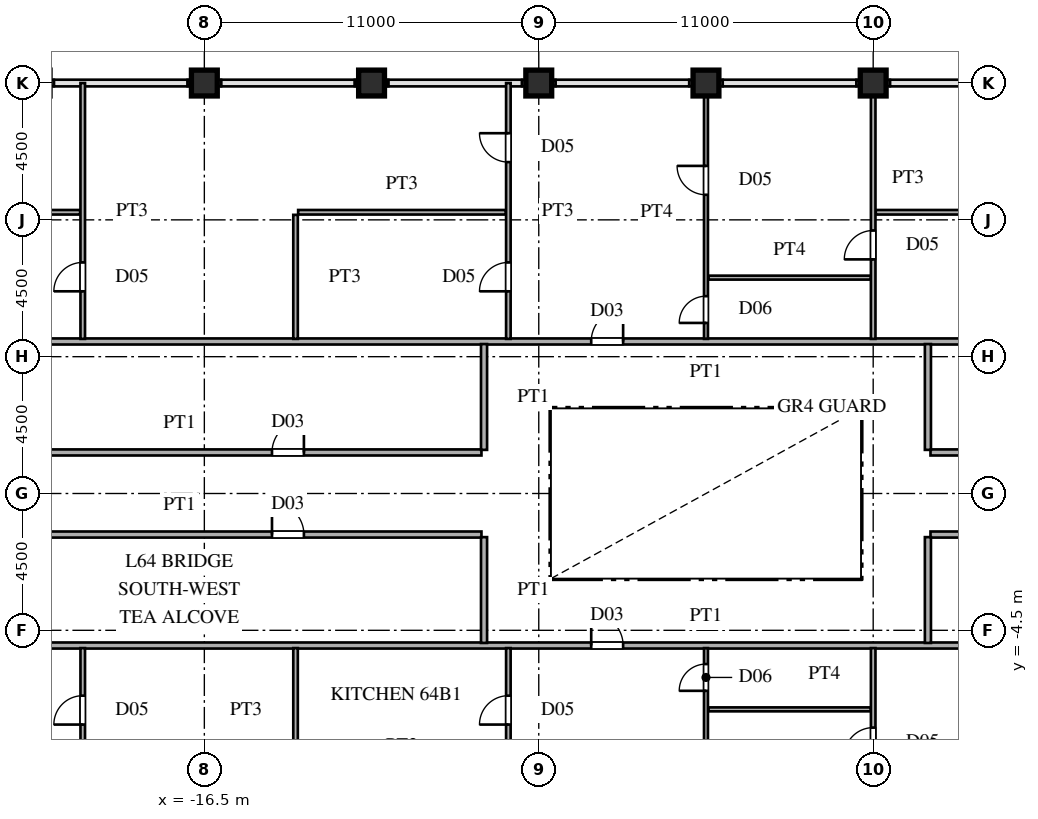
"""IFC4 building model, lengths in metres.
Left out: names, types, materials, properties, quantities, classifications, styles, units other than length and angle.
Written with IfcOpenShell. Run it as: python <this file> out.ifc"""

import sys

from ifc_helpers import new_model, si_unit, direction, frame, frame_2d, origin, origin_2d, place, context, subcontext, project, spatial, rectangle, hollow_rectangle, extrude, source, transform, mapped, element, fill, save


model = new_model("IFC4")
c1 = context("Model", 3, precision=1e-05, world=origin(), true_north=direction((0.0, 1.0)))
c2 = subcontext(c1, "Body", "Model", "MODEL_VIEW")
j1 = project(units=[si_unit("LENGTHUNIT", "METRE"), si_unit("PLANEANGLEUNIT", "RADIAN")], contexts=[c1])
p1 = place(None, origin())
s1 = spatial("IfcSite", under=j1, at=p1, CompositionType="ELEMENT")
p2 = place(p1, origin())
s2 = spatial("IfcBuilding", under=s1, at=p2, CompositionType="ELEMENT")
p3 = place(p2, frame((0.0, 0.0, 243.15)))
s3 = spatial("IfcBuildingStorey", under=s2, at=p3, CompositionType="ELEMENT", Elevation=243.15)
m1 = source(origin(), c2, "Body", "SweptSolid", [
    extrude(hollow_rectangle(XDim=0.85, YDim=0.85, WallThickness=0.036, at=origin_2d()), origin(), (0.0, 0.0, 1.0), 3.75),
])
for number, where, z_axis, x_axis in (
    (1, (-16.5, 13.5, 0.0), (0.0, 0.0, 1.0), (1.0, 0.0, 0.0)),
    (2, (-11.0, 13.5, 0.0), (0.0, 0.0, 1.0), (1.0, 0.0, 0.0)),
    (3, (-5.5, 13.5, 0.0), (0.0, 0.0, 1.0), (1.0, 0.0, 0.0)),
    (4, (0.0, 13.5, 0.0), (0.0, 0.0, 1.0), (1.0, 0.0, 0.0)),
    (5, (5.5, 13.5, 0.0), (0.0, 0.0, 1.0), (1.0, 0.0, 0.0)),
):
    element("IfcColumn", number, at=place(p3, frame(where, z_axis=z_axis, x_axis=x_axis)), inside=s3, PredefinedType="COLUMN", context=c2, shape_type="MappedRepresentation", body=[
        mapped(m1, transform((0.0, 0.0, 0.0), scale=1.0)),
    ])
for number, where, z_axis, x_axis in (
    (6, (-22.55, 13.5, 0.0), (0.0, 0.0, 1.0), (1.0, 0.0, 0.0)),
    (7, (-17.05, 13.5, 0.0), (0.0, 0.0, 1.0), (1.0, 0.0, 0.0)),
    (8, (-11.55, 13.5, 0.0), (0.0, 0.0, 1.0), (1.0, 0.0, 0.0)),
    (9, (-6.05, 13.5, 0.0), (0.0, 0.0, 1.0), (1.0, 0.0, 0.0)),
    (10, (-0.55, 13.5, 0.0), (0.0, 0.0, 1.0), (1.0, 0.0, 0.0)),
    (11, (4.95, 13.5, 0.0), (0.0, 0.0, 1.0), (1.0, 0.0, 0.0)),
):
    element("IfcWall", number, at=place(p3, frame(where, z_axis=z_axis, x_axis=x_axis)), inside=s3, PredefinedType="SOLIDWALL", context=c2, shape_type="SweptSolid", body=[
        extrude(rectangle(XDim=1.1, YDim=0.21, at=frame_2d((0.55, 0.0))), origin(), (0.0, 0.0, 1.0), 3.03),
    ])
p4 = place(p3, frame((0.085, -7.1, 0.0), z_axis=(0.0, 0.0, 1.0), x_axis=(1.0, 0.0, 0.0)))
e12 = element("IfcWall", 12, at=p4, inside=s3, PredefinedType="PARTITIONING", context=c2, shape_type="SweptSolid", body=[
    extrude(rectangle(XDim=5.33, YDim=0.13, at=frame_2d((2.665, 0.0))), origin(), (0.0, 0.0, 1.0), 3.53),
])
p5 = place(p3, frame((-27.245, -5.0, 0.0), z_axis=(0.0, 0.0, 1.0), x_axis=(1.0, 0.0, 0.0)))
e13 = element("IfcWall", 13, at=p5, inside=s3, PredefinedType="PARTITIONING", context=c2, shape_type="SweptSolid", body=[
    extrude(rectangle(XDim=54.49, YDim=0.2, at=frame_2d((27.245, 0.0))), origin(), (0.0, 0.0, 1.0), 3.53),
])
p6 = place(p5, frame((23.47, 0.0, 0.0)))
e14 = element("IfcOpeningElement", 14, at=p6, cuts=e13, PredefinedType="OPENING", context=c2, shape_type="SweptSolid", body=[
    extrude(rectangle(XDim=1.05, YDim=2.25, at=frame_2d((0.525, 1.125))), frame((0.0, 0.11, 0.0), z_axis=(0.0, -1.0, 0.0), x_axis=(1.0, 0.0, 0.0)), (0.0, 0.0, 1.0), 0.22),
])
p7 = place(p3, frame((-27.245, -1.35, 0.0), z_axis=(0.0, 0.0, 1.0), x_axis=(1.0, 0.0, 0.0)))
e15 = element("IfcWall", 15, at=p7, inside=s3, PredefinedType="PARTITIONING", context=c2, shape_type="SweptSolid", body=[
    extrude(rectangle(XDim=19.86, YDim=0.2, at=frame_2d((9.93, 0.0))), origin(), (0.0, 0.0, 1.0), 3.53),
])
p8 = place(p7, frame((12.97, 0.0, 0.0)))
e16 = element("IfcOpeningElement", 16, at=p8, cuts=e15, PredefinedType="OPENING", context=c2, shape_type="SweptSolid", body=[
    extrude(rectangle(XDim=1.05, YDim=2.25, at=frame_2d((0.525, 1.125))), frame((0.0, 0.11, 0.0), z_axis=(0.0, -1.0, 0.0), x_axis=(1.0, 0.0, 0.0)), (0.0, 0.0, 1.0), 0.22),
])
p9 = place(p3, frame((7.385, -1.35, 0.0), z_axis=(0.0, 0.0, 1.0), x_axis=(1.0, 0.0, 0.0)))
e17 = element("IfcWall", 17, at=p9, inside=s3, PredefinedType="PARTITIONING", context=c2, shape_type="SweptSolid", body=[
    extrude(rectangle(XDim=19.86, YDim=0.2, at=frame_2d((9.93, 0.0))), origin(), (0.0, 0.0, 1.0), 3.53),
])
p10 = place(p9, frame((5.84, 0.0, 0.0)))
e18 = element("IfcOpeningElement", 18, at=p10, cuts=e17, PredefinedType="OPENING", context=c2, shape_type="SweptSolid", body=[
    extrude(rectangle(XDim=1.05, YDim=2.25, at=frame_2d((0.525, 1.125))), frame((0.0, 0.11, 0.0), z_axis=(0.0, -1.0, 0.0), x_axis=(1.0, 0.0, 0.0)), (0.0, 0.0, 1.0), 0.22),
])
p11 = place(p3, frame((-27.245, 1.35, 0.0), z_axis=(0.0, 0.0, 1.0), x_axis=(1.0, 0.0, 0.0)))
e19 = element("IfcWall", 19, at=p11, inside=s3, PredefinedType="PARTITIONING", context=c2, shape_type="SweptSolid", body=[
    extrude(rectangle(XDim=19.86, YDim=0.2, at=frame_2d((9.93, 0.0))), origin(), (0.0, 0.0, 1.0), 3.53),
])
p12 = place(p11, frame((12.97, 0.0, 0.0)))
e20 = element("IfcOpeningElement", 20, at=p12, cuts=e19, PredefinedType="OPENING", context=c2, shape_type="SweptSolid", body=[
    extrude(rectangle(XDim=1.05, YDim=2.25, at=frame_2d((0.525, 1.125))), frame((0.0, 0.11, 0.0), z_axis=(0.0, -1.0, 0.0), x_axis=(1.0, 0.0, 0.0)), (0.0, 0.0, 1.0), 0.22),
])
p13 = place(p3, frame((7.385, 1.35, 0.0), z_axis=(0.0, 0.0, 1.0), x_axis=(1.0, 0.0, 0.0)))
e21 = element("IfcWall", 21, at=p13, inside=s3, PredefinedType="PARTITIONING", context=c2, shape_type="SweptSolid", body=[
    extrude(rectangle(XDim=19.86, YDim=0.2, at=frame_2d((9.93, 0.0))), origin(), (0.0, 0.0, 1.0), 3.53),
])
p14 = place(p13, frame((5.84, 0.0, 0.0)))
e22 = element("IfcOpeningElement", 22, at=p14, cuts=e21, PredefinedType="OPENING", context=c2, shape_type="SweptSolid", body=[
    extrude(rectangle(XDim=1.05, YDim=2.25, at=frame_2d((0.525, 1.125))), frame((0.0, 0.11, 0.0), z_axis=(0.0, -1.0, 0.0), x_axis=(1.0, 0.0, 0.0)), (0.0, 0.0, 1.0), 0.22),
])
p15 = place(p3, frame((-27.245, 5.0, 0.0), z_axis=(0.0, 0.0, 1.0), x_axis=(1.0, 0.0, 0.0)))
e23 = element("IfcWall", 23, at=p15, inside=s3, PredefinedType="PARTITIONING", context=c2, shape_type="SweptSolid", body=[
    extrude(rectangle(XDim=54.49, YDim=0.2, at=frame_2d((27.245, 0.0))), origin(), (0.0, 0.0, 1.0), 3.53),
])
p16 = place(p15, frame((23.47, 0.0, 0.0)))
e24 = element("IfcOpeningElement", 24, at=p16, cuts=e23, PredefinedType="OPENING", context=c2, shape_type="SweptSolid", body=[
    extrude(rectangle(XDim=1.05, YDim=2.25, at=frame_2d((0.525, 1.125))), frame((0.0, 0.11, 0.0), z_axis=(0.0, -1.0, 0.0), x_axis=(1.0, 0.0, 0.0)), (0.0, 0.0, 1.0), 0.22),
])
p17 = place(p3, frame((0.085, 7.1, 0.0), z_axis=(0.0, 0.0, 1.0), x_axis=(1.0, 0.0, 0.0)))
e25 = element("IfcWall", 25, at=p17, inside=s3, PredefinedType="PARTITIONING", context=c2, shape_type="SweptSolid", body=[
    extrude(rectangle(XDim=5.33, YDim=0.13, at=frame_2d((2.665, 0.0))), origin(), (0.0, 0.0, 1.0), 3.53),
])
p18 = place(p3, frame((-27.245, 9.25, 0.0), z_axis=(0.0, 0.0, 1.0), x_axis=(1.0, 0.0, 0.0)))
e26 = element("IfcWall", 26, at=p18, inside=s3, PredefinedType="PARTITIONING", context=c2, shape_type="SweptSolid", body=[
    extrude(rectangle(XDim=6.66, YDim=0.15, at=frame_2d((3.33, 0.0))), origin(), (0.0, 0.0, 1.0), 3.53),
])
p19 = place(p18, frame((3.07, 0.0, 0.0)))
e27 = element("IfcOpeningElement", 27, at=p19, cuts=e26, PredefinedType="OPENING", context=c2, shape_type="SweptSolid", body=[
    extrude(rectangle(XDim=0.95, YDim=2.15, at=frame_2d((0.475, 1.075))), frame((0.0, 0.085, 0.0), z_axis=(0.0, -1.0, 0.0), x_axis=(1.0, 0.0, 0.0)), (0.0, 0.0, 1.0), 0.17),
])
p20 = place(p3, frame((-13.415, 9.25, 0.0), z_axis=(0.0, 0.0, 1.0), x_axis=(1.0, 0.0, 0.0)))
e28 = element("IfcWall", 28, at=p20, inside=s3, PredefinedType="PARTITIONING", context=c2, shape_type="SweptSolid", body=[
    extrude(rectangle(XDim=6.83, YDim=0.15, at=frame_2d((3.415, 0.0))), origin(), (0.0, 0.0, 1.0), 3.53),
])
p21 = place(p3, frame((5.585, 9.25, 0.0), z_axis=(0.0, 0.0, 1.0), x_axis=(1.0, 0.0, 0.0)))
e29 = element("IfcWall", 29, at=p21, inside=s3, PredefinedType="PARTITIONING", context=c2, shape_type="SweptSolid", body=[
    extrude(rectangle(XDim=21.66, YDim=0.15, at=frame_2d((10.83, 0.0))), origin(), (0.0, 0.0, 1.0), 3.53),
])
p22 = place(p21, frame((3.94, 0.0, 0.0)))
e30 = element("IfcOpeningElement", 30, at=p22, cuts=e29, PredefinedType="OPENING", context=c2, shape_type="SweptSolid", body=[
    extrude(rectangle(XDim=0.95, YDim=2.15, at=frame_2d((0.475, 1.075))), frame((0.0, 0.085, 0.0), z_axis=(0.0, -1.0, 0.0), x_axis=(1.0, 0.0, 0.0)), (0.0, 0.0, 1.0), 0.17),
])
p23 = place(p21, frame((11.69, 0.0, 0.0)))
e31 = element("IfcOpeningElement", 31, at=p23, cuts=e29, PredefinedType="OPENING", context=c2, shape_type="SweptSolid", body=[
    extrude(rectangle(XDim=0.95, YDim=2.15, at=frame_2d((0.475, 1.075))), frame((0.0, 0.085, 0.0), z_axis=(0.0, -1.0, 0.0), x_axis=(1.0, 0.0, 0.0)), (0.0, 0.0, 1.0), 0.17),
])
p24 = place(p21, frame((18.19, 0.0, 0.0)))
e32 = element("IfcOpeningElement", 32, at=p24, cuts=e29, PredefinedType="OPENING", context=c2, shape_type="SweptSolid", body=[
    extrude(rectangle(XDim=0.95, YDim=2.15, at=frame_2d((0.475, 1.075))), frame((0.0, 0.085, 0.0), z_axis=(0.0, -1.0, 0.0), x_axis=(1.0, 0.0, 0.0)), (0.0, 0.0, 1.0), 0.17),
])
p25 = place(p3, frame((-20.5, -13.5, 0.0), z_axis=(0.0, 0.0, 1.0), x_axis=(0.0, 1.0, 0.0)))
e33 = element("IfcWall", 33, at=p25, inside=s3, PredefinedType="PARTITIONING", context=c2, shape_type="SweptSolid", body=[
    extrude(rectangle(XDim=8.415, YDim=0.15, at=frame_2d((4.208, 0.0))), origin(), (0.0, 0.0, 1.0), 3.53),
])
p26 = place(p25, frame((5.9, 0.0, 0.0)))
e34 = element("IfcOpeningElement", 34, at=p26, cuts=e33, PredefinedType="OPENING", context=c2, shape_type="SweptSolid", body=[
    extrude(rectangle(XDim=0.95, YDim=2.15, at=frame_2d((0.475, 1.075))), frame((0.0, 0.085, 0.0), z_axis=(0.0, -1.0, 0.0), x_axis=(1.0, 0.0, 0.0)), (0.0, 0.0, 1.0), 0.17),
])
p27 = place(p3, frame((-20.5, 5.085, 0.0), z_axis=(0.0, 0.0, 1.0), x_axis=(0.0, 1.0, 0.0)))
e35 = element("IfcWall", 35, at=p27, inside=s3, PredefinedType="PARTITIONING", context=c2, shape_type="SweptSolid", body=[
    extrude(rectangle(XDim=8.415, YDim=0.15, at=frame_2d((4.208, 0.0))), origin(), (0.0, 0.0, 1.0), 3.53),
])
p28 = place(p27, frame((1.565, 0.0, 0.0)))
e36 = element("IfcOpeningElement", 36, at=p28, cuts=e35, PredefinedType="OPENING", context=c2, shape_type="SweptSolid", body=[
    extrude(rectangle(XDim=0.95, YDim=2.15, at=frame_2d((0.475, 1.075))), frame((0.0, 0.085, 0.0), z_axis=(0.0, -1.0, 0.0), x_axis=(1.0, 0.0, 0.0)), (0.0, 0.0, 1.0), 0.17),
])
for number, where, z_axis, x_axis in (
    (37, (-13.5, -9.165, 0.0), (0.0, 0.0, 1.0), (0.0, 1.0, 0.0)),
    (38, (-13.5, 5.085, 0.0), (0.0, 0.0, 1.0), (0.0, 1.0, 0.0)),
):
    element("IfcWall", number, at=place(p3, frame(where, z_axis=z_axis, x_axis=x_axis)), inside=s3, PredefinedType="PARTITIONING", context=c2, shape_type="SweptSolid", body=[
        extrude(rectangle(XDim=4.08, YDim=0.15, at=frame_2d((2.04, 0.0))), origin(), (0.0, 0.0, 1.0), 3.53),
    ])
for number, where, z_axis, x_axis in (
    (39, (-7.3, -4.915, 0.0), (0.0, 0.0, 1.0), (0.0, 1.0, 0.0)),
    (40, (-7.3, 1.435, 0.0), (0.0, 0.0, 1.0), (0.0, 1.0, 0.0)),
):
    element("IfcWall", number, at=place(p3, frame(where, z_axis=z_axis, x_axis=x_axis)), inside=s3, PredefinedType="PARTITIONING", context=c2, shape_type="SweptSolid", body=[
        extrude(rectangle(XDim=3.48, YDim=0.2, at=frame_2d((1.74, 0.0))), origin(), (0.0, 0.0, 1.0), 3.53),
    ])
p29 = place(p3, frame((-6.5, -13.5, 0.0), z_axis=(0.0, 0.0, 1.0), x_axis=(0.0, 1.0, 0.0)))
e41 = element("IfcWall", 41, at=p29, inside=s3, PredefinedType="PARTITIONING", context=c2, shape_type="SweptSolid", body=[
    extrude(rectangle(XDim=8.415, YDim=0.15, at=frame_2d((4.208, 0.0))), origin(), (0.0, 0.0, 1.0), 3.53),
])
p30 = place(p29, frame((5.9, 0.0, 0.0)))
e42 = element("IfcOpeningElement", 42, at=p30, cuts=e41, PredefinedType="OPENING", context=c2, shape_type="SweptSolid", body=[
    extrude(rectangle(XDim=0.95, YDim=2.15, at=frame_2d((0.475, 1.075))), frame((0.0, 0.085, 0.0), z_axis=(0.0, -1.0, 0.0), x_axis=(1.0, 0.0, 0.0)), (0.0, 0.0, 1.0), 0.17),
])
p31 = place(p29, frame((1.65, 0.0, 0.0)))
e43 = element("IfcOpeningElement", 43, at=p31, cuts=e41, PredefinedType="OPENING", context=c2, shape_type="SweptSolid", body=[
    extrude(rectangle(XDim=0.95, YDim=2.15, at=frame_2d((0.475, 1.075))), frame((0.0, 0.085, 0.0), z_axis=(0.0, -1.0, 0.0), x_axis=(1.0, 0.0, 0.0)), (0.0, 0.0, 1.0), 0.17),
])
p32 = place(p3, frame((-6.5, 5.085, 0.0), z_axis=(0.0, 0.0, 1.0), x_axis=(0.0, 1.0, 0.0)))
e44 = element("IfcWall", 44, at=p32, inside=s3, PredefinedType="PARTITIONING", context=c2, shape_type="SweptSolid", body=[
    extrude(rectangle(XDim=8.415, YDim=0.15, at=frame_2d((4.208, 0.0))), origin(), (0.0, 0.0, 1.0), 3.53),
])
p33 = place(p32, frame((1.565, 0.0, 0.0)))
e45 = element("IfcOpeningElement", 45, at=p33, cuts=e44, PredefinedType="OPENING", context=c2, shape_type="SweptSolid", body=[
    extrude(rectangle(XDim=0.95, YDim=2.15, at=frame_2d((0.475, 1.075))), frame((0.0, 0.085, 0.0), z_axis=(0.0, -1.0, 0.0), x_axis=(1.0, 0.0, 0.0)), (0.0, 0.0, 1.0), 0.17),
])
p34 = place(p32, frame((5.815, 0.0, 0.0)))
e46 = element("IfcOpeningElement", 46, at=p34, cuts=e44, PredefinedType="OPENING", context=c2, shape_type="SweptSolid", body=[
    extrude(rectangle(XDim=0.95, YDim=2.15, at=frame_2d((0.475, 1.075))), frame((0.0, 0.085, 0.0), z_axis=(0.0, -1.0, 0.0), x_axis=(1.0, 0.0, 0.0)), (0.0, 0.0, 1.0), 0.17),
])
p35 = place(p3, frame((0.0, -13.39, 0.0), z_axis=(0.0, 0.0, 1.0), x_axis=(0.0, 1.0, 0.0)))
e47 = element("IfcWall", 47, at=p35, inside=s3, PredefinedType="PARTITIONING", context=c2, shape_type="SweptSolid", body=[
    extrude(rectangle(XDim=8.305, YDim=0.13, at=frame_2d((4.152, 0.0))), origin(), (0.0, 0.0, 1.0), 2.43),
])
p36 = place(p35, frame((6.9, 0.0, 0.0)))
e48 = element("IfcOpeningElement", 48, at=p36, cuts=e47, PredefinedType="OPENING", context=c2, shape_type="SweptSolid", body=[
    extrude(rectangle(XDim=0.88, YDim=2.1, at=frame_2d((0.44, 1.05))), frame((0.0, 0.075, 0.0), z_axis=(0.0, -1.0, 0.0), x_axis=(1.0, 0.0, 0.0)), (0.0, 0.0, 1.0), 0.15),
])
p37 = place(p35, frame((2.615, 0.0, 0.0)))
e49 = element("IfcOpeningElement", 49, at=p37, cuts=e47, PredefinedType="OPENING", context=c2, shape_type="SweptSolid", body=[
    extrude(rectangle(XDim=0.95, YDim=2.15, at=frame_2d((0.475, 1.075))), frame((0.0, 0.075, 0.0), z_axis=(0.0, -1.0, 0.0), x_axis=(1.0, 0.0, 0.0)), (0.0, 0.0, 1.0), 0.15),
])
p38 = place(p3, frame((0.0, 5.085, 0.0), z_axis=(0.0, 0.0, 1.0), x_axis=(0.0, 1.0, 0.0)))
e50 = element("IfcWall", 50, at=p38, inside=s3, PredefinedType="PARTITIONING", context=c2, shape_type="SweptSolid", body=[
    extrude(rectangle(XDim=8.305, YDim=0.13, at=frame_2d((4.152, 0.0))), origin(), (0.0, 0.0, 1.0), 2.43),
])
p39 = place(p38, frame((0.525, 0.0, 0.0)))
e51 = element("IfcOpeningElement", 51, at=p39, cuts=e50, PredefinedType="OPENING", context=c2, shape_type="SweptSolid", body=[
    extrude(rectangle(XDim=0.88, YDim=2.1, at=frame_2d((0.44, 1.05))), frame((0.0, 0.075, 0.0), z_axis=(0.0, -1.0, 0.0), x_axis=(1.0, 0.0, 0.0)), (0.0, 0.0, 1.0), 0.15),
])
p40 = place(p38, frame((4.74, 0.0, 0.0)))
e52 = element("IfcOpeningElement", 52, at=p40, cuts=e50, PredefinedType="OPENING", context=c2, shape_type="SweptSolid", body=[
    extrude(rectangle(XDim=0.95, YDim=2.15, at=frame_2d((0.475, 1.075))), frame((0.0, 0.075, 0.0), z_axis=(0.0, -1.0, 0.0), x_axis=(1.0, 0.0, 0.0)), (0.0, 0.0, 1.0), 0.15),
])
p41 = place(p3, frame((5.5, -13.39, 0.0), z_axis=(0.0, 0.0, 1.0), x_axis=(0.0, 1.0, 0.0)))
e53 = element("IfcWall", 53, at=p41, inside=s3, PredefinedType="PARTITIONING", context=c2, shape_type="SweptSolid", body=[
    extrude(rectangle(XDim=8.305, YDim=0.15, at=frame_2d((4.152, 0.0))), origin(), (0.0, 0.0, 1.0), 2.43),
])
p42 = place(p41, frame((4.74, 0.0, 0.0)))
e54 = element("IfcOpeningElement", 54, at=p42, cuts=e53, PredefinedType="OPENING", context=c2, shape_type="SweptSolid", body=[
    extrude(rectangle(XDim=0.95, YDim=2.15, at=frame_2d((0.475, 1.075))), frame((0.0, 0.085, 0.0), z_axis=(0.0, -1.0, 0.0), x_axis=(1.0, 0.0, 0.0)), (0.0, 0.0, 1.0), 0.17),
])
p43 = place(p3, frame((5.5, 5.085, 0.0), z_axis=(0.0, 0.0, 1.0), x_axis=(0.0, 1.0, 0.0)))
e55 = element("IfcWall", 55, at=p43, inside=s3, PredefinedType="PARTITIONING", context=c2, shape_type="SweptSolid", body=[
    extrude(rectangle(XDim=8.305, YDim=0.15, at=frame_2d((4.152, 0.0))), origin(), (0.0, 0.0, 1.0), 2.43),
])
p44 = place(p43, frame((2.615, 0.0, 0.0)))
e56 = element("IfcOpeningElement", 56, at=p44, cuts=e55, PredefinedType="OPENING", context=c2, shape_type="SweptSolid", body=[
    extrude(rectangle(XDim=0.95, YDim=2.15, at=frame_2d((0.475, 1.075))), frame((0.0, 0.085, 0.0), z_axis=(0.0, -1.0, 0.0), x_axis=(1.0, 0.0, 0.0)), (0.0, 0.0, 1.0), 0.17),
])
for number, where, z_axis, x_axis in (
    (57, (7.3, -4.915, 0.0), (0.0, 0.0, 1.0), (0.0, 1.0, 0.0)),
    (58, (7.3, 1.435, 0.0), (0.0, 0.0, 1.0), (0.0, 1.0, 0.0)),
):
    element("IfcWall", number, at=place(p3, frame(where, z_axis=z_axis, x_axis=x_axis)), inside=s3, PredefinedType="PARTITIONING", context=c2, shape_type="SweptSolid", body=[
        extrude(rectangle(XDim=3.48, YDim=0.2, at=frame_2d((1.74, 0.0))), origin(), (0.0, 0.0, 1.0), 3.53),
    ])
m2 = source(origin(), c2, "Body", "SweptSolid", [
    extrude(rectangle(XDim=1.05, YDim=2.25, at=frame_2d((0.525, 1.125))), frame((0.0, 0.025, 0.0), z_axis=(0.0, -1.0, 0.0), x_axis=(1.0, 0.0, 0.0)), (0.0, 0.0, 1.0), 0.05),
])
p45 = place(p6, origin())
e59 = element("IfcDoor", 59, at=p45, inside=s3, OperationType="SINGLE_SWING_LEFT", PredefinedType="DOOR", context=c2, shape_type="MappedRepresentation", body=[
    mapped(m2, transform((0.0, 0.0, 0.0), scale=1.0)),
])
fill(e14, e59)
p46 = place(p8, origin())
e60 = element("IfcDoor", 60, at=p46, inside=s3, OperationType="SINGLE_SWING_LEFT", PredefinedType="DOOR", context=c2, shape_type="MappedRepresentation", body=[
    mapped(m2, transform((0.0, 0.0, 0.0), scale=1.0)),
])
fill(e16, e60)
p47 = place(p12, origin())
e61 = element("IfcDoor", 61, at=p47, inside=s3, OperationType="SINGLE_SWING_RIGHT", PredefinedType="DOOR", context=c2, shape_type="MappedRepresentation", body=[
    mapped(m2, transform((0.0, 0.0, 0.0), scale=1.0)),
])
fill(e20, e61)
p48 = place(p16, origin())
e62 = element("IfcDoor", 62, at=p48, inside=s3, OperationType="SINGLE_SWING_RIGHT", PredefinedType="DOOR", context=c2, shape_type="MappedRepresentation", body=[
    mapped(m2, transform((0.0, 0.0, 0.0), scale=1.0)),
])
fill(e24, e62)
m3 = source(origin(), c2, "Body", "SweptSolid", [
    extrude(rectangle(XDim=0.95, YDim=2.15, at=frame_2d((0.475, 1.075))), frame((0.0, 0.025, 0.0), z_axis=(0.0, -1.0, 0.0), x_axis=(1.0, 0.0, 0.0)), (0.0, 0.0, 1.0), 0.05),
])
p49 = place(p26, origin())
e63 = element("IfcDoor", 63, at=p49, inside=s3, OperationType="SINGLE_SWING_LEFT", PredefinedType="DOOR", context=c2, shape_type="MappedRepresentation", body=[
    mapped(m3, transform((0.0, 0.0, 0.0), scale=1.0)),
])
fill(e34, e63)
p50 = place(p28, origin())
e64 = element("IfcDoor", 64, at=p50, inside=s3, OperationType="SINGLE_SWING_LEFT", PredefinedType="DOOR", context=c2, shape_type="MappedRepresentation", body=[
    mapped(m3, transform((0.0, 0.0, 0.0), scale=1.0)),
])
fill(e36, e64)
p51 = place(p30, origin())
e65 = element("IfcDoor", 65, at=p51, inside=s3, OperationType="SINGLE_SWING_LEFT", PredefinedType="DOOR", context=c2, shape_type="MappedRepresentation", body=[
    mapped(m3, transform((0.0, 0.0, 0.0), scale=1.0)),
])
fill(e42, e65)
p52 = place(p33, origin())
e66 = element("IfcDoor", 66, at=p52, inside=s3, OperationType="SINGLE_SWING_LEFT", PredefinedType="DOOR", context=c2, shape_type="MappedRepresentation", body=[
    mapped(m3, transform((0.0, 0.0, 0.0), scale=1.0)),
])
fill(e45, e66)
p53 = place(p34, origin())
e67 = element("IfcDoor", 67, at=p53, inside=s3, OperationType="SINGLE_SWING_RIGHT", PredefinedType="DOOR", context=c2, shape_type="MappedRepresentation", body=[
    mapped(m3, transform((0.0, 0.0, 0.0), scale=1.0)),
])
fill(e46, e67)
m4 = source(origin(), c2, "Body", "SweptSolid", [
    extrude(rectangle(XDim=0.88, YDim=2.1, at=frame_2d((0.44, 1.05))), frame((0.0, 0.025, 0.0), z_axis=(0.0, -1.0, 0.0), x_axis=(1.0, 0.0, 0.0)), (0.0, 0.0, 1.0), 0.05),
])
p54 = place(p36, origin())
e68 = element("IfcDoor", 68, at=p54, inside=s3, OperationType="SINGLE_SWING_LEFT", PredefinedType="DOOR", context=c2, shape_type="MappedRepresentation", body=[
    mapped(m4, transform((0.0, 0.0, 0.0), scale=1.0)),
])
fill(e48, e68)
p55 = place(p39, origin())
e69 = element("IfcDoor", 69, at=p55, inside=s3, OperationType="SINGLE_SWING_LEFT", PredefinedType="DOOR", context=c2, shape_type="MappedRepresentation", body=[
    mapped(m4, transform((0.0, 0.0, 0.0), scale=1.0)),
])
fill(e51, e69)
p56 = place(p40, origin())
e70 = element("IfcDoor", 70, at=p56, inside=s3, OperationType="SINGLE_SWING_RIGHT", PredefinedType="DOOR", context=c2, shape_type="MappedRepresentation", body=[
    mapped(m3, transform((0.0, 0.0, 0.0), scale=1.0)),
])
fill(e52, e70)
p57 = place(p42, origin())
e71 = element("IfcDoor", 71, at=p57, inside=s3, OperationType="SINGLE_SWING_LEFT", PredefinedType="DOOR", context=c2, shape_type="MappedRepresentation", body=[
    mapped(m3, transform((0.0, 0.0, 0.0), scale=1.0)),
])
fill(e54, e71)
p58 = place(p44, origin())
e72 = element("IfcDoor", 72, at=p58, inside=s3, OperationType="SINGLE_SWING_LEFT", PredefinedType="DOOR", context=c2, shape_type="MappedRepresentation", body=[
    mapped(m3, transform((0.0, 0.0, 0.0), scale=1.0)),
])
fill(e56, e72)
save(model, sys.argv[1])
